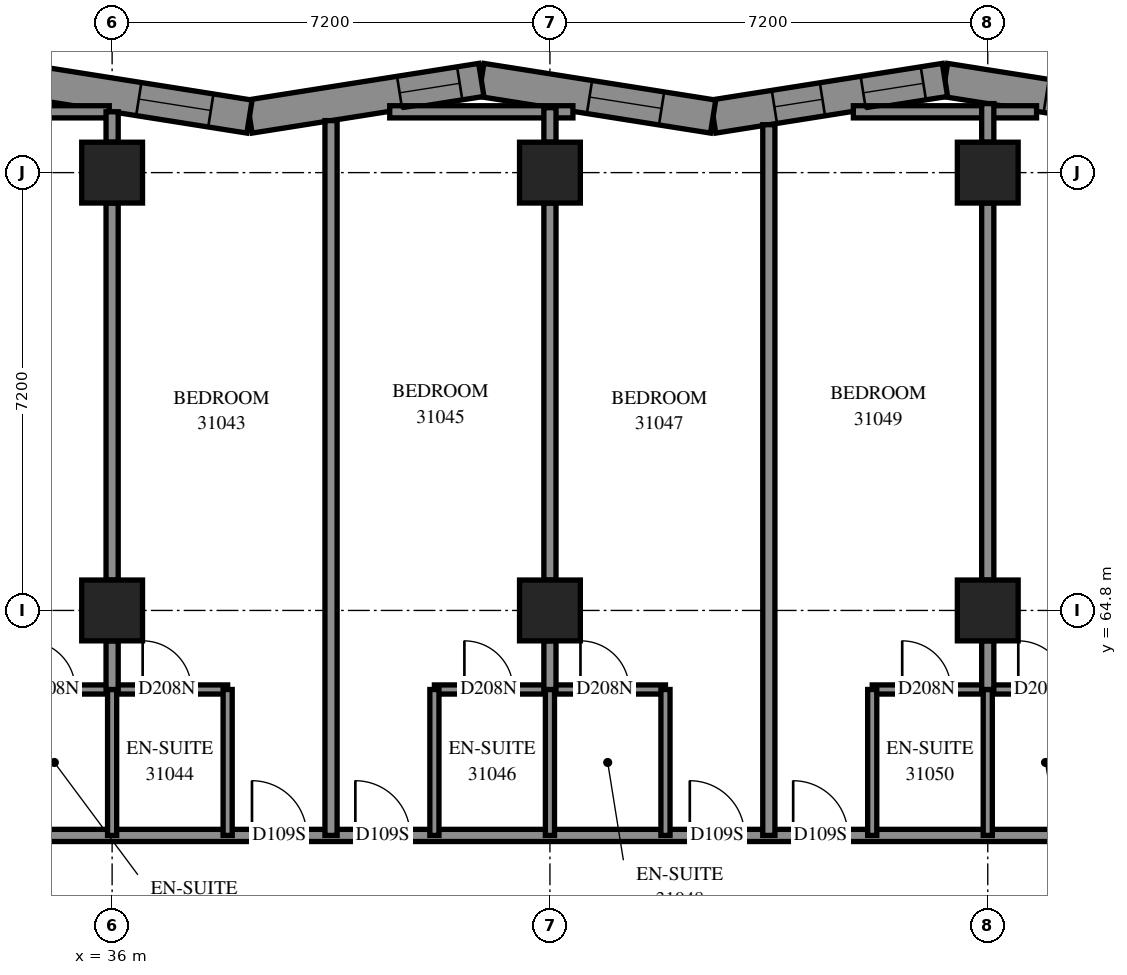
"""IFC4 building model, lengths in metres.
Left out: names, types, materials, properties, quantities, classifications, styles, units other than length and angle.
Written with IfcOpenShell. Run it as: python <this file> out.ifc"""

import sys

from ifc_helpers import new_model, si_unit, direction, frame, frame_2d, origin, origin_2d, place, context, subcontext, project, spatial, polyline, rectangle, outline, extrude, element, fill, save


model = new_model("IFC4")
c1 = context("Model", 3, precision=1e-05, world=origin(), true_north=direction((0.0, 1.0)))
c2 = subcontext(c1, "Body", "Model", "MODEL_VIEW")
j1 = project(units=[si_unit("LENGTHUNIT", "METRE"), si_unit("PLANEANGLEUNIT", "RADIAN")], contexts=[c1])
p1 = place(None, origin())
s1 = spatial("IfcSite", under=j1, at=p1, CompositionType="ELEMENT")
p2 = place(p1, origin())
s2 = spatial("IfcBuilding", under=s1, at=p2, CompositionType="ELEMENT")
p3 = place(p2, frame((0.0, 0.0, 115.2)))
s3 = spatial("IfcBuildingStorey", under=s2, at=p3, CompositionType="ELEMENT", Elevation=115.2)
for number, where, z_axis, x_axis in (
    (1, (36.0, 64.8, 0.0), (0.0, 0.0, 1.0), (1.0, 0.0, 0.0)),
    (2, (36.0, 72.0, 0.0), (0.0, 0.0, 1.0), (1.0, 0.0, 0.0)),
    (3, (43.2, 64.8, 0.0), (0.0, 0.0, 1.0), (1.0, 0.0, 0.0)),
    (4, (43.2, 72.0, 0.0), (0.0, 0.0, 1.0), (1.0, 0.0, 0.0)),
    (5, (50.4, 64.8, 0.0), (0.0, 0.0, 1.0), (1.0, 0.0, 0.0)),
    (6, (50.4, 72.0, 0.0), (0.0, 0.0, 1.0), (1.0, 0.0, 0.0)),
):
    element("IfcColumn", number, at=place(p3, frame(where, z_axis=z_axis, x_axis=x_axis)), inside=s3, PredefinedType="COLUMN", context=c2, shape_type="SweptSolid", body=[
        extrude(rectangle(XDim=1.0, YDim=1.0, at=origin_2d()), origin(), (0.0, 0.0, 1.0), 3.1),
    ])
p4 = place(p3, frame((53.509, 72.922, 0.0), z_axis=(0.0, 0.0, 1.0), x_axis=(-0.9877213372, 0.1562259905, 0.0)))
e7 = element("IfcWall", 7, at=p4, inside=s3, PredefinedType="SOLIDWALL", context=c2, shape_type="SweptSolid", body=[
    extrude(outline(polyline([(0.043, -0.275), (3.903, -0.275), (3.816, 0.275), (-0.043, 0.275), (0.043, -0.275)])), origin(), (0.0, 0.0, 1.0), 3.1),
])
p5 = place(p4, frame((0.974, 0.0, 0.5)))
e8 = element("IfcOpeningElement", 8, at=p5, cuts=e7, PredefinedType="OPENING", context=c2, shape_type="SweptSolid", body=[
    extrude(rectangle(XDim=1.2, YDim=2.45, at=frame_2d((0.6, 1.225))), frame((0.0, 0.285, 0.0), z_axis=(0.0, -1.0, 0.0), x_axis=(1.0, 0.0, 0.0)), (0.0, 0.0, 1.0), 0.57),
])
p6 = place(p3, frame((49.696, 73.525, 0.0), z_axis=(0.0, 0.0, 1.0), x_axis=(-0.9877213372, -0.1562259905, 0.0)))
e9 = element("IfcWall", 9, at=p6, inside=s3, PredefinedType="SOLIDWALL", context=c2, shape_type="SweptSolid", body=[
    extrude(outline(polyline([(-0.043, -0.275), (3.816, -0.275), (3.903, 0.275), (0.043, 0.275), (-0.043, -0.275)])), origin(), (0.0, 0.0, 1.0), 3.1),
])
p7 = place(p6, frame((0.36, 0.0, 0.45)))
e10 = element("IfcOpeningElement", 10, at=p7, cuts=e9, PredefinedType="OPENING", context=c2, shape_type="SweptSolid", body=[
    extrude(rectangle(XDim=1.0, YDim=2.5, at=frame_2d((0.5, 1.25))), frame((0.0, 0.285, 0.0), z_axis=(0.0, -1.0, 0.0), x_axis=(1.0, 0.0, 0.0)), (0.0, 0.0, 1.0), 0.57),
])
p8 = place(p6, frame((2.04, 0.0, 0.45)))
e11 = element("IfcOpeningElement", 11, at=p8, cuts=e9, PredefinedType="OPENING", context=c2, shape_type="SweptSolid", body=[
    extrude(rectangle(XDim=0.8, YDim=2.5, at=frame_2d((0.4, 1.25))), frame((0.0, 0.285, 0.0), z_axis=(0.0, -1.0, 0.0), x_axis=(1.0, 0.0, 0.0)), (0.0, 0.0, 1.0), 0.57),
])
p9 = place(p3, frame((45.884, 72.922, 0.0), z_axis=(0.0, 0.0, 1.0), x_axis=(-0.9877213372, 0.1562259905, 0.0)))
e12 = element("IfcWall", 12, at=p9, inside=s3, PredefinedType="SOLIDWALL", context=c2, shape_type="SweptSolid", body=[
    extrude(outline(polyline([(0.043, -0.275), (3.903, -0.275), (3.816, 0.275), (-0.043, 0.275), (0.043, -0.275)])), origin(), (0.0, 0.0, 1.0), 3.1),
])
p10 = place(p9, frame((0.859, 0.0, 0.5)))
e13 = element("IfcOpeningElement", 13, at=p10, cuts=e12, PredefinedType="OPENING", context=c2, shape_type="SweptSolid", body=[
    extrude(rectangle(XDim=1.2, YDim=2.45, at=frame_2d((0.6, 1.225))), frame((0.0, 0.285, 0.0), z_axis=(0.0, -1.0, 0.0), x_axis=(1.0, 0.0, 0.0)), (0.0, 0.0, 1.0), 0.57),
])
p11 = place(p3, frame((42.071, 73.525, 0.0), z_axis=(0.0, 0.0, 1.0), x_axis=(-0.9877213372, -0.1562259905, 0.0)))
e14 = element("IfcWall", 14, at=p11, inside=s3, PredefinedType="SOLIDWALL", context=c2, shape_type="SweptSolid", body=[
    extrude(outline(polyline([(-0.043, -0.275), (3.816, -0.275), (3.903, 0.275), (0.043, 0.275), (-0.043, -0.275)])), origin(), (0.0, 0.0, 1.0), 3.1),
])
p12 = place(p11, frame((0.36, 0.0, 0.45)))
e15 = element("IfcOpeningElement", 15, at=p12, cuts=e14, PredefinedType="OPENING", context=c2, shape_type="SweptSolid", body=[
    extrude(rectangle(XDim=1.0, YDim=2.5, at=frame_2d((0.5, 1.25))), frame((0.0, 0.285, 0.0), z_axis=(0.0, -1.0, 0.0), x_axis=(1.0, 0.0, 0.0)), (0.0, 0.0, 1.0), 0.57),
])
p13 = place(p3, frame((38.259, 72.922, 0.0), z_axis=(0.0, 0.0, 1.0), x_axis=(-0.9877213372, 0.1562259905, 0.0)))
e16 = element("IfcWall", 16, at=p13, inside=s3, PredefinedType="SOLIDWALL", context=c2, shape_type="SweptSolid", body=[
    extrude(outline(polyline([(0.043, -0.275), (3.903, -0.275), (3.816, 0.275), (-0.043, 0.275), (0.043, -0.275)])), origin(), (0.0, 0.0, 1.0), 3.1),
])
p14 = place(p13, frame((0.643, 0.0, 0.5)))
e17 = element("IfcOpeningElement", 17, at=p14, cuts=e16, PredefinedType="OPENING", context=c2, shape_type="SweptSolid", body=[
    extrude(rectangle(XDim=1.2, YDim=2.45, at=frame_2d((0.6, 1.225))), frame((0.0, 0.285, 0.0), z_axis=(0.0, -1.0, 0.0), x_axis=(1.0, 0.0, 0.0)), (0.0, 0.0, 1.0), 0.57),
])
p15 = place(p3, frame((33.502, 61.1, 0.0), z_axis=(0.0, 0.0, 1.0), x_axis=(1.0, 0.0, 0.0)))
e18 = element("IfcWall", 18, at=p15, inside=s3, PredefinedType="PARTITIONING", context=c2, shape_type="SweptSolid", body=[
    extrude(rectangle(XDim=21.198, YDim=0.2, at=frame_2d((10.599, 0.0))), origin(), (0.0, 0.0, 1.0), 3.1),
])
p16 = place(p15, frame((4.798, 0.0, 0.0)))
e19 = element("IfcOpeningElement", 19, at=p16, cuts=e18, PredefinedType="OPENING", context=c2, shape_type="SweptSolid", body=[
    extrude(rectangle(XDim=0.9, YDim=2.1, at=frame_2d((0.45, 1.05))), frame((0.0, 0.11, 0.0), z_axis=(0.0, -1.0, 0.0), x_axis=(1.0, 0.0, 0.0)), (0.0, 0.0, 1.0), 0.22),
])
p17 = place(p15, frame((6.498, 0.0, 0.0)))
e20 = element("IfcOpeningElement", 20, at=p17, cuts=e18, PredefinedType="OPENING", context=c2, shape_type="SweptSolid", body=[
    extrude(rectangle(XDim=0.9, YDim=2.1, at=frame_2d((0.45, 1.05))), frame((0.0, 0.11, 0.0), z_axis=(0.0, -1.0, 0.0), x_axis=(1.0, 0.0, 0.0)), (0.0, 0.0, 1.0), 0.22),
])
p18 = place(p15, frame((11.998, 0.0, 0.0)))
e21 = element("IfcOpeningElement", 21, at=p18, cuts=e18, PredefinedType="OPENING", context=c2, shape_type="SweptSolid", body=[
    extrude(rectangle(XDim=0.9, YDim=2.1, at=frame_2d((0.45, 1.05))), frame((0.0, 0.11, 0.0), z_axis=(0.0, -1.0, 0.0), x_axis=(1.0, 0.0, 0.0)), (0.0, 0.0, 1.0), 0.22),
])
p19 = place(p15, frame((13.698, 0.0, 0.0)))
e22 = element("IfcOpeningElement", 22, at=p19, cuts=e18, PredefinedType="OPENING", context=c2, shape_type="SweptSolid", body=[
    extrude(rectangle(XDim=0.9, YDim=2.1, at=frame_2d((0.45, 1.05))), frame((0.0, 0.11, 0.0), z_axis=(0.0, -1.0, 0.0), x_axis=(1.0, 0.0, 0.0)), (0.0, 0.0, 1.0), 0.22),
])
p20 = place(p15, frame((19.198, 0.0, 0.0)))
e23 = element("IfcOpeningElement", 23, at=p20, cuts=e18, PredefinedType="OPENING", context=c2, shape_type="SweptSolid", body=[
    extrude(rectangle(XDim=0.9, YDim=2.1, at=frame_2d((0.45, 1.05))), frame((0.0, 0.11, 0.0), z_axis=(0.0, -1.0, 0.0), x_axis=(1.0, 0.0, 0.0)), (0.0, 0.0, 1.0), 0.22),
])
p21 = place(p3, frame((39.6, 61.1, 0.0), z_axis=(0.0, 0.0, 1.0), x_axis=(0.0, 1.0, 0.0)))
e24 = element("IfcWall", 24, at=p21, inside=s3, PredefinedType="PARTITIONING", context=c2, shape_type="SweptSolid", body=[
    extrude(rectangle(XDim=11.755, YDim=0.2, at=frame_2d((5.878, 0.0))), origin(), (0.0, 0.0, 1.0), 3.1),
])
p22 = place(p3, frame((46.8, 61.1, 0.0), z_axis=(0.0, 0.0, 1.0), x_axis=(0.0, 1.0, 0.0)))
e25 = element("IfcWall", 25, at=p22, inside=s3, PredefinedType="PARTITIONING", context=c2, shape_type="SweptSolid", body=[
    extrude(rectangle(XDim=11.688, YDim=0.2, at=frame_2d((5.844, 0.0))), origin(), (0.0, 0.0, 1.0), 3.1),
])
for number, where, z_axis, x_axis in (
    (26, (36.0, 65.3, 0.0), (0.0, 0.0, 1.0), (0.0, 1.0, 0.0)),
    (27, (43.2, 65.3, 0.0), (0.0, 0.0, 1.0), (0.0, 1.0, 0.0)),
    (28, (50.4, 65.3, 0.0), (0.0, 0.0, 1.0), (0.0, 1.0, 0.0)),
):
    element("IfcWall", number, at=place(p3, frame(where, z_axis=z_axis, x_axis=x_axis)), inside=s3, PredefinedType="PARTITIONING", context=c2, shape_type="SweptSolid", body=[
        extrude(rectangle(XDim=6.2, YDim=0.2, at=frame_2d((3.1, 0.0))), origin(), (0.0, 0.0, 1.0), 3.1),
    ])
p23 = place(p3, frame((41.3, 63.5, 0.0), z_axis=(0.0, 0.0, 1.0), x_axis=(1.0, 0.0, 0.0)))
e29 = element("IfcWall", 29, at=p23, inside=s3, PredefinedType="PARTITIONING", context=c2, shape_type="SweptSolid", body=[
    extrude(rectangle(XDim=3.8, YDim=0.15, at=frame_2d((1.9, 0.0))), origin(), (0.0, 0.0, 1.0), 3.1),
])
p24 = place(p23, frame((0.493, 0.0, 0.0)))
e30 = element("IfcOpeningElement", 30, at=p24, cuts=e29, PredefinedType="OPENING", context=c2, shape_type="SweptSolid", body=[
    extrude(rectangle(XDim=0.8, YDim=2.1, at=frame_2d((0.4, 1.05))), frame((0.0, 0.085, 0.0), z_axis=(0.0, -1.0, 0.0), x_axis=(1.0, 0.0, 0.0)), (0.0, 0.0, 1.0), 0.17),
])
p25 = place(p23, frame((2.402, 0.0, 0.0)))
e31 = element("IfcOpeningElement", 31, at=p25, cuts=e29, PredefinedType="OPENING", context=c2, shape_type="SweptSolid", body=[
    extrude(rectangle(XDim=0.8, YDim=2.1, at=frame_2d((0.4, 1.05))), frame((0.0, 0.085, 0.0), z_axis=(0.0, -1.0, 0.0), x_axis=(1.0, 0.0, 0.0)), (0.0, 0.0, 1.0), 0.17),
])
p26 = place(p3, frame((34.1, 63.5, 0.0), z_axis=(0.0, 0.0, 1.0), x_axis=(1.0, 0.0, 0.0)))
e32 = element("IfcWall", 32, at=p26, inside=s3, PredefinedType="PARTITIONING", context=c2, shape_type="SweptSolid", body=[
    extrude(rectangle(XDim=3.8, YDim=0.15, at=frame_2d((1.9, 0.0))), origin(), (0.0, 0.0, 1.0), 3.1),
])
p27 = place(p26, frame((0.493, 0.0, 0.0)))
e33 = element("IfcOpeningElement", 33, at=p27, cuts=e32, PredefinedType="OPENING", context=c2, shape_type="SweptSolid", body=[
    extrude(rectangle(XDim=0.8, YDim=2.1, at=frame_2d((0.4, 1.05))), frame((0.0, 0.085, 0.0), z_axis=(0.0, -1.0, 0.0), x_axis=(1.0, 0.0, 0.0)), (0.0, 0.0, 1.0), 0.17),
])
p28 = place(p26, frame((2.402, 0.0, 0.0)))
e34 = element("IfcOpeningElement", 34, at=p28, cuts=e32, PredefinedType="OPENING", context=c2, shape_type="SweptSolid", body=[
    extrude(rectangle(XDim=0.8, YDim=2.1, at=frame_2d((0.4, 1.05))), frame((0.0, 0.085, 0.0), z_axis=(0.0, -1.0, 0.0), x_axis=(1.0, 0.0, 0.0)), (0.0, 0.0, 1.0), 0.17),
])
p29 = place(p3, frame((48.5, 63.5, 0.0), z_axis=(0.0, 0.0, 1.0), x_axis=(1.0, 0.0, 0.0)))
e35 = element("IfcWall", 35, at=p29, inside=s3, PredefinedType="PARTITIONING", context=c2, shape_type="SweptSolid", body=[
    extrude(rectangle(XDim=3.8, YDim=0.15, at=frame_2d((1.9, 0.0))), origin(), (0.0, 0.0, 1.0), 3.1),
])
p30 = place(p29, frame((0.493, 0.0, 0.0)))
e36 = element("IfcOpeningElement", 36, at=p30, cuts=e35, PredefinedType="OPENING", context=c2, shape_type="SweptSolid", body=[
    extrude(rectangle(XDim=0.8, YDim=2.1, at=frame_2d((0.4, 1.05))), frame((0.0, 0.085, 0.0), z_axis=(0.0, -1.0, 0.0), x_axis=(1.0, 0.0, 0.0)), (0.0, 0.0, 1.0), 0.17),
])
p31 = place(p29, frame((2.402, 0.0, 0.0)))
e37 = element("IfcOpeningElement", 37, at=p31, cuts=e35, PredefinedType="OPENING", context=c2, shape_type="SweptSolid", body=[
    extrude(rectangle(XDim=0.8, YDim=2.1, at=frame_2d((0.4, 1.05))), frame((0.0, 0.085, 0.0), z_axis=(0.0, -1.0, 0.0), x_axis=(1.0, 0.0, 0.0)), (0.0, 0.0, 1.0), 0.17),
])
for number, where, z_axis, x_axis in (
    (38, (32.94, 73.0, 0.0), (0.0, 0.0, 1.0), (1.0, 0.0, 0.0)),
    (39, (40.565, 73.0, 0.0), (0.0, 0.0, 1.0), (1.0, 0.0, 0.0)),
    (40, (48.19, 73.0, 0.0), (0.0, 0.0, 1.0), (1.0, 0.0, 0.0)),
):
    element("IfcWall", number, at=place(p3, frame(where, z_axis=z_axis, x_axis=x_axis)), inside=s3, PredefinedType="PARTITIONING", context=c2, shape_type="SweptSolid", body=[
        extrude(rectangle(XDim=3.013, YDim=0.2, at=frame_2d((1.506, 0.0))), origin(), (0.0, 0.0, 1.0), 3.1),
    ])
for number, where, z_axis, x_axis in (
    (41, (36.0, 61.1, 0.0), (0.0, 0.0, 1.0), (0.0, 1.0, 0.0)),
    (42, (37.9, 61.1, 0.0), (0.0, 0.0, 1.0), (0.0, 1.0, 0.0)),
    (43, (41.3, 61.1, 0.0), (0.0, 0.0, 1.0), (0.0, 1.0, 0.0)),
    (44, (43.2, 61.1, 0.0), (0.0, 0.0, 1.0), (0.0, 1.0, 0.0)),
    (45, (45.1, 61.1, 0.0), (0.0, 0.0, 1.0), (0.0, 1.0, 0.0)),
    (46, (48.5, 61.1, 0.0), (0.0, 0.0, 1.0), (0.0, 1.0, 0.0)),
    (47, (50.4, 61.1, 0.0), (0.0, 0.0, 1.0), (0.0, 1.0, 0.0)),
):
    element("IfcWall", number, at=place(p3, frame(where, z_axis=z_axis, x_axis=x_axis)), inside=s3, PredefinedType="PARTITIONING", context=c2, shape_type="SweptSolid", body=[
        extrude(rectangle(XDim=2.4, YDim=0.15, at=frame_2d((1.2, 0.0))), origin(), (0.0, 0.0, 1.0), 3.1),
    ])
for number, where, z_axis, x_axis in (
    (48, (36.0, 63.5, 0.0), (0.0, 0.0, 1.0), (0.0, 1.0, 0.0)),
    (49, (43.2, 63.5, 0.0), (0.0, 0.0, 1.0), (0.0, 1.0, 0.0)),
    (50, (50.4, 63.5, 0.0), (0.0, 0.0, 1.0), (0.0, 1.0, 0.0)),
):
    element("IfcWall", number, at=place(p3, frame(where, z_axis=z_axis, x_axis=x_axis)), inside=s3, PredefinedType="PARTITIONING", context=c2, shape_type="SweptSolid", body=[
        extrude(rectangle(XDim=0.8, YDim=0.2, at=frame_2d((0.4, 0.0))), origin(), (0.0, 0.0, 1.0), 3.1),
    ])
p32 = place(p3, frame((50.4, 72.5, 0.0), z_axis=(0.0, 0.0, 1.0), x_axis=(0.0, 1.0, 0.0)))
e51 = element("IfcWall", 51, at=p32, inside=s3, PredefinedType="PARTITIONING", context=c2, shape_type="SweptSolid", body=[
    extrude(rectangle(XDim=0.635, YDim=0.2, at=frame_2d((0.317, 0.0))), origin(), (0.0, 0.0, 1.0), 3.1),
])
p33 = place(p3, frame((43.2, 72.5, 0.0), z_axis=(0.0, 0.0, 1.0), x_axis=(0.0, 1.0, 0.0)))
e52 = element("IfcWall", 52, at=p33, inside=s3, PredefinedType="PARTITIONING", context=c2, shape_type="SweptSolid", body=[
    extrude(rectangle(XDim=0.568, YDim=0.2, at=frame_2d((0.284, 0.0))), origin(), (0.0, 0.0, 1.0), 3.1),
])
p34 = place(p3, frame((36.0, 72.5, 0.0), z_axis=(0.0, 0.0, 1.0), x_axis=(0.0, 1.0, 0.0)))
e53 = element("IfcWall", 53, at=p34, inside=s3, PredefinedType="PARTITIONING", context=c2, shape_type="SweptSolid", body=[
    extrude(rectangle(XDim=0.5, YDim=0.2, at=frame_2d((0.25, 0.0))), origin(), (0.0, 0.0, 1.0), 3.1),
])
p35 = place(p5, origin())
e54 = element("IfcWindow", 54, at=p35, inside=s3, PartitioningType="SINGLE_PANEL", PredefinedType="WINDOW", context=c2, shape_type="SweptSolid", body=[
    extrude(rectangle(XDim=1.2, YDim=2.45, at=frame_2d((0.6, 1.225))), frame((0.0, 0.155, 0.0), z_axis=(0.0, -1.0, 0.0), x_axis=(1.0, 0.0, 0.0)), (0.0, 0.0, 1.0), 0.06),
])
fill(e8, e54)
p36 = place(p10, origin())
e55 = element("IfcWindow", 55, at=p36, inside=s3, PartitioningType="SINGLE_PANEL", PredefinedType="WINDOW", context=c2, shape_type="SweptSolid", body=[
    extrude(rectangle(XDim=1.2, YDim=2.45, at=frame_2d((0.6, 1.225))), frame((0.0, 0.155, 0.0), z_axis=(0.0, -1.0, 0.0), x_axis=(1.0, 0.0, 0.0)), (0.0, 0.0, 1.0), 0.06),
])
fill(e13, e55)
p37 = place(p14, origin())
e56 = element("IfcWindow", 56, at=p37, inside=s3, PartitioningType="SINGLE_PANEL", PredefinedType="WINDOW", context=c2, shape_type="SweptSolid", body=[
    extrude(rectangle(XDim=1.2, YDim=2.45, at=frame_2d((0.6, 1.225))), frame((0.0, 0.155, 0.0), z_axis=(0.0, -1.0, 0.0), x_axis=(1.0, 0.0, 0.0)), (0.0, 0.0, 1.0), 0.06),
])
fill(e17, e56)
p38 = place(p27, origin())
e57 = element("IfcDoor", 57, at=p38, inside=s3, OperationType="SINGLE_SWING_RIGHT", PredefinedType="DOOR", context=c2, shape_type="SweptSolid", body=[
    extrude(rectangle(XDim=0.8, YDim=2.1, at=frame_2d((0.4, 1.05))), frame((0.0, 0.025, 0.0), z_axis=(0.0, -1.0, 0.0), x_axis=(1.0, 0.0, 0.0)), (0.0, 0.0, 1.0), 0.05),
])
fill(e33, e57)
p39 = place(p16, origin())
e58 = element("IfcDoor", 58, at=p39, inside=s3, OperationType="SINGLE_SWING_RIGHT", PredefinedType="DOOR", context=c2, shape_type="SweptSolid", body=[
    extrude(rectangle(XDim=0.9, YDim=2.1, at=frame_2d((0.45, 1.05))), frame((0.0, 0.025, 0.0), z_axis=(0.0, -1.0, 0.0), x_axis=(1.0, 0.0, 0.0)), (0.0, 0.0, 1.0), 0.05),
])
fill(e19, e58)
p40 = place(p28, origin())
e59 = element("IfcDoor", 59, at=p40, inside=s3, OperationType="SINGLE_SWING_RIGHT", PredefinedType="DOOR", context=c2, shape_type="SweptSolid", body=[
    extrude(rectangle(XDim=0.8, YDim=2.1, at=frame_2d((0.4, 1.05))), frame((0.0, 0.025, 0.0), z_axis=(0.0, -1.0, 0.0), x_axis=(1.0, 0.0, 0.0)), (0.0, 0.0, 1.0), 0.05),
])
fill(e34, e59)
p41 = place(p17, origin())
e60 = element("IfcDoor", 60, at=p41, inside=s3, OperationType="SINGLE_SWING_LEFT", PredefinedType="DOOR", context=c2, shape_type="SweptSolid", body=[
    extrude(rectangle(XDim=0.9, YDim=2.1, at=frame_2d((0.45, 1.05))), frame((0.0, 0.025, 0.0), z_axis=(0.0, -1.0, 0.0), x_axis=(1.0, 0.0, 0.0)), (0.0, 0.0, 1.0), 0.05),
])
fill(e20, e60)
p42 = place(p24, origin())
e61 = element("IfcDoor", 61, at=p42, inside=s3, OperationType="SINGLE_SWING_RIGHT", PredefinedType="DOOR", context=c2, shape_type="SweptSolid", body=[
    extrude(rectangle(XDim=0.8, YDim=2.1, at=frame_2d((0.4, 1.05))), frame((0.0, 0.025, 0.0), z_axis=(0.0, -1.0, 0.0), x_axis=(1.0, 0.0, 0.0)), (0.0, 0.0, 1.0), 0.05),
])
fill(e30, e61)
p43 = place(p18, origin())
e62 = element("IfcDoor", 62, at=p43, inside=s3, OperationType="SINGLE_SWING_RIGHT", PredefinedType="DOOR", context=c2, shape_type="SweptSolid", body=[
    extrude(rectangle(XDim=0.9, YDim=2.1, at=frame_2d((0.45, 1.05))), frame((0.0, 0.025, 0.0), z_axis=(0.0, -1.0, 0.0), x_axis=(1.0, 0.0, 0.0)), (0.0, 0.0, 1.0), 0.05),
])
fill(e21, e62)
p44 = place(p25, origin())
e63 = element("IfcDoor", 63, at=p44, inside=s3, OperationType="SINGLE_SWING_RIGHT", PredefinedType="DOOR", context=c2, shape_type="SweptSolid", body=[
    extrude(rectangle(XDim=0.8, YDim=2.1, at=frame_2d((0.4, 1.05))), frame((0.0, 0.025, 0.0), z_axis=(0.0, -1.0, 0.0), x_axis=(1.0, 0.0, 0.0)), (0.0, 0.0, 1.0), 0.05),
])
fill(e31, e63)
p45 = place(p19, origin())
e64 = element("IfcDoor", 64, at=p45, inside=s3, OperationType="SINGLE_SWING_LEFT", PredefinedType="DOOR", context=c2, shape_type="SweptSolid", body=[
    extrude(rectangle(XDim=0.9, YDim=2.1, at=frame_2d((0.45, 1.05))), frame((0.0, 0.025, 0.0), z_axis=(0.0, -1.0, 0.0), x_axis=(1.0, 0.0, 0.0)), (0.0, 0.0, 1.0), 0.05),
])
fill(e22, e64)
p46 = place(p30, origin())
e65 = element("IfcDoor", 65, at=p46, inside=s3, OperationType="SINGLE_SWING_RIGHT", PredefinedType="DOOR", context=c2, shape_type="SweptSolid", body=[
    extrude(rectangle(XDim=0.8, YDim=2.1, at=frame_2d((0.4, 1.05))), frame((0.0, 0.025, 0.0), z_axis=(0.0, -1.0, 0.0), x_axis=(1.0, 0.0, 0.0)), (0.0, 0.0, 1.0), 0.05),
])
fill(e36, e65)
p47 = place(p31, origin())
e66 = element("IfcDoor", 66, at=p47, inside=s3, OperationType="SINGLE_SWING_RIGHT", PredefinedType="DOOR", context=c2, shape_type="SweptSolid", body=[
    extrude(rectangle(XDim=0.8, YDim=2.1, at=frame_2d((0.4, 1.05))), frame((0.0, 0.025, 0.0), z_axis=(0.0, -1.0, 0.0), x_axis=(1.0, 0.0, 0.0)), (0.0, 0.0, 1.0), 0.05),
])
fill(e37, e66)
p48 = place(p7, origin())
e67 = element("IfcWindow", 67, at=p48, inside=s3, PartitioningType="SINGLE_PANEL", PredefinedType="WINDOW", context=c2, shape_type="SweptSolid", body=[
    extrude(rectangle(XDim=1.0, YDim=2.5, at=frame_2d((0.5, 1.25))), frame((0.0, 0.155, 0.0), z_axis=(0.0, -1.0, 0.0), x_axis=(1.0, 0.0, 0.0)), (0.0, 0.0, 1.0), 0.06),
])
fill(e10, e67)
p49 = place(p8, origin())
e68 = element("IfcWindow", 68, at=p49, inside=s3, PartitioningType="SINGLE_PANEL", PredefinedType="WINDOW", context=c2, shape_type="SweptSolid", body=[
    extrude(rectangle(XDim=0.8, YDim=2.5, at=frame_2d((0.4, 1.25))), frame((0.0, 0.155, 0.0), z_axis=(0.0, -1.0, 0.0), x_axis=(1.0, 0.0, 0.0)), (0.0, 0.0, 1.0), 0.06),
])
fill(e11, e68)
p50 = place(p12, origin())
e69 = element("IfcWindow", 69, at=p50, inside=s3, PartitioningType="SINGLE_PANEL", PredefinedType="WINDOW", context=c2, shape_type="SweptSolid", body=[
    extrude(rectangle(XDim=1.0, YDim=2.5, at=frame_2d((0.5, 1.25))), frame((0.0, 0.155, 0.0), z_axis=(0.0, -1.0, 0.0), x_axis=(1.0, 0.0, 0.0)), (0.0, 0.0, 1.0), 0.06),
])
fill(e15, e69)
save(model, sys.argv[1])
